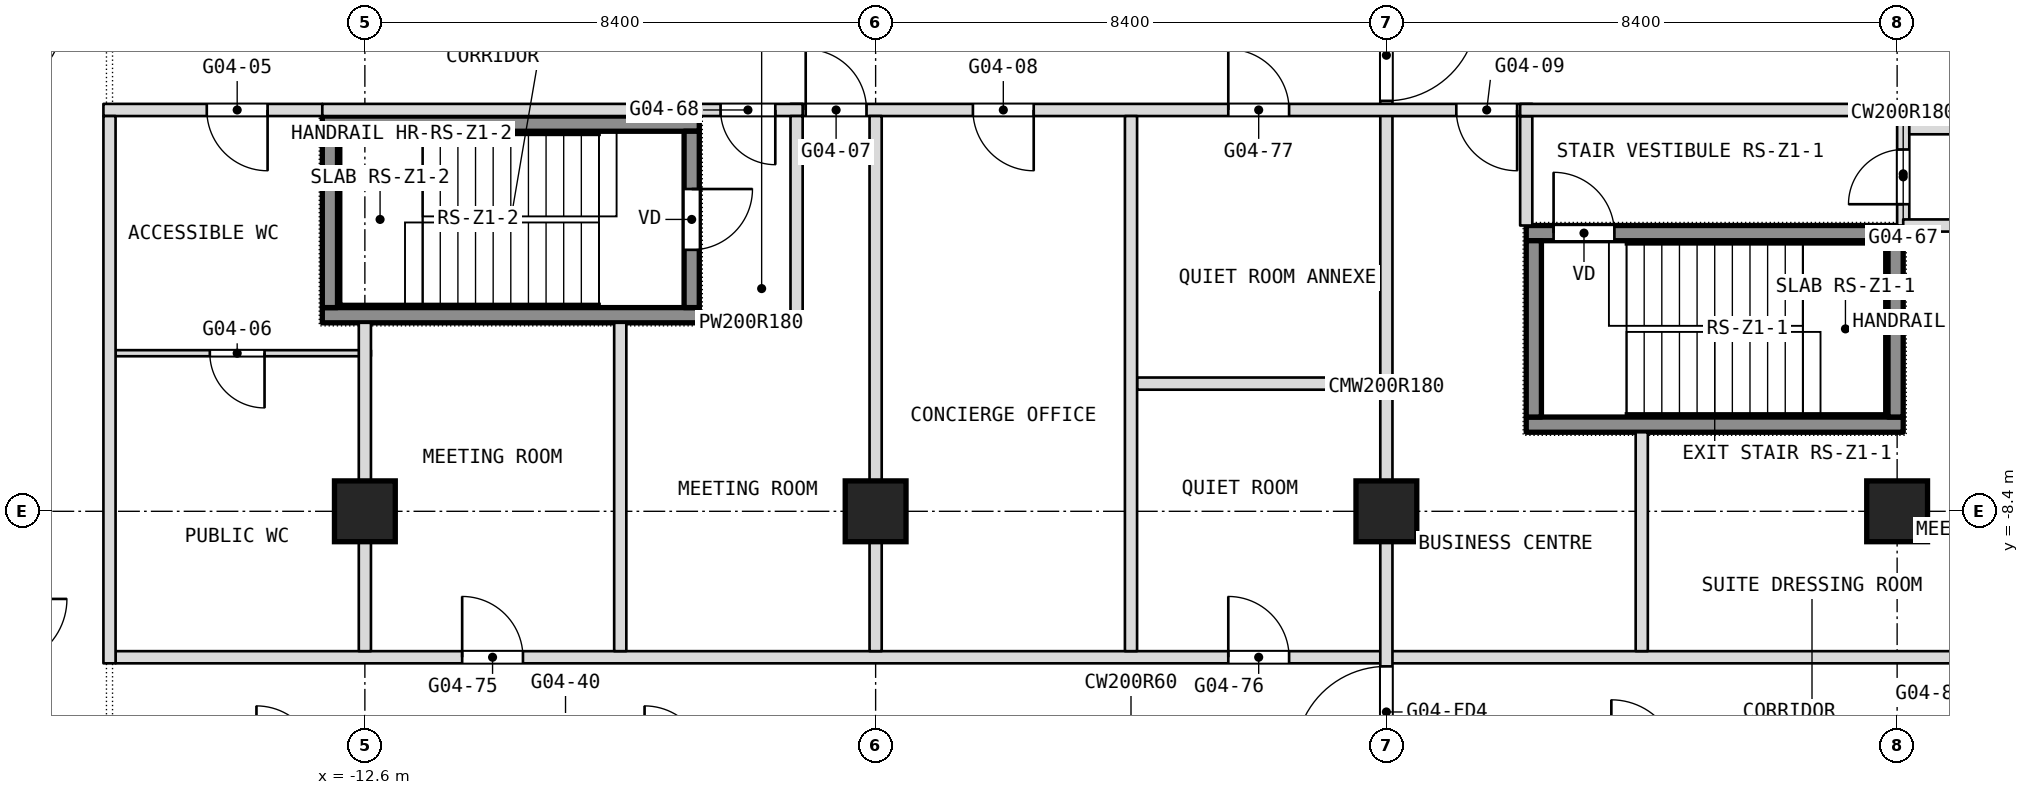
"""IFC4 building model, lengths in metres.
Left out: names, types, materials, properties, quantities, classifications, styles, units other than length and angle.
Written with IfcOpenShell. Run it as: python <this file> out.ifc"""

import sys

from ifc_helpers import new_model, si_unit, direction, frame, frame_2d, origin, origin_2d, place, context, subcontext, project, spatial, rectangle, extrude, element, fill, save


model = new_model("IFC4")
c1 = context("Model", 3, precision=1e-05, world=origin(), true_north=direction((0.0, 1.0)))
c2 = subcontext(c1, "Body", "Model", "MODEL_VIEW")
j1 = project(units=[si_unit("LENGTHUNIT", "METRE"), si_unit("PLANEANGLEUNIT", "RADIAN")], contexts=[c1])
p1 = place(None, origin())
s1 = spatial("IfcSite", under=j1, at=p1, CompositionType="ELEMENT")
p2 = place(p1, origin())
s2 = spatial("IfcBuilding", under=s1, at=p2, CompositionType="ELEMENT")
p3 = place(p2, frame((0.0, 0.0, 58.1)))
s3 = spatial("IfcBuildingStorey", under=s2, at=p3, CompositionType="ELEMENT", Elevation=58.1)
for number, where, z_axis, x_axis in (
    (1, (-12.6, -8.4, 0.0), (0.0, 0.0, 1.0), (1.0, 0.0, 0.0)),
    (2, (-4.2, -8.4, 0.0), (0.0, 0.0, 1.0), (1.0, 0.0, 0.0)),
    (3, (4.2, -8.4, 0.0), (0.0, 0.0, 1.0), (1.0, 0.0, 0.0)),
    (4, (12.6, -8.4, 0.0), (0.0, 0.0, 1.0), (1.0, 0.0, 0.0)),
):
    element("IfcColumn", number, at=place(p3, frame(where, z_axis=z_axis, x_axis=x_axis)), inside=s3, PredefinedType="COLUMN", context=c2, shape_type="SweptSolid", body=[
        extrude(rectangle(XDim=1.0, YDim=1.0, at=origin_2d()), origin(), (0.0, 0.0, 1.0), 3.6),
    ])
p4 = place(p3, frame((12.7, -3.7, 0.0), z_axis=(0.0, 0.0, 1.0), x_axis=(0.0, 1.0, 0.0)))
e5 = element("IfcWall", 5, at=p4, inside=s3, PredefinedType="PARTITIONING", context=c2, shape_type="SweptSolid", body=[
    extrude(rectangle(XDim=1.7, YDim=0.2, at=frame_2d((0.85, 0.0))), origin(), (0.0, 0.0, 1.0), 3.34),
])
p5 = place(p4, frame((0.35, 0.0, 0.0)))
e6 = element("IfcOpeningElement", 6, at=p5, cuts=e5, PredefinedType="OPENING", context=c2, shape_type="SweptSolid", body=[
    extrude(rectangle(XDim=0.9, YDim=2.1, at=frame_2d((0.45, 1.05))), frame((0.0, 0.1, 0.0), z_axis=(0.0, -1.0, 0.0), x_axis=(1.0, 0.0, 0.0)), (0.0, 0.0, 1.0), 0.2),
])
p6 = place(p3, frame((-16.7, -10.8, 0.0), z_axis=(0.0, 0.0, 1.0), x_axis=(1.0, 0.0, 0.0)))
e7 = element("IfcWall", 7, at=p6, inside=s3, PredefinedType="PARTITIONING", context=c2, shape_type="SweptSolid", body=[
    extrude(rectangle(XDim=33.4, YDim=0.2, at=frame_2d((16.7, 0.0))), origin(), (0.0, 0.0, 1.0), 3.34),
])
p7 = place(p6, frame((5.7, 0.0, 0.0)))
e8 = element("IfcOpeningElement", 8, at=p7, cuts=e7, PredefinedType="OPENING", context=c2, shape_type="SweptSolid", body=[
    extrude(rectangle(XDim=1.0, YDim=2.1, at=frame_2d((0.5, 1.05))), frame((0.0, 0.1, 0.0), z_axis=(0.0, -1.0, 0.0), x_axis=(1.0, 0.0, 0.0)), (0.0, 0.0, 1.0), 0.2),
])
p8 = place(p6, frame((18.3, 0.0, 0.0)))
e9 = element("IfcOpeningElement", 9, at=p8, cuts=e7, PredefinedType="OPENING", context=c2, shape_type="SweptSolid", body=[
    extrude(rectangle(XDim=1.0, YDim=2.1, at=frame_2d((0.5, 1.05))), frame((0.0, 0.1, 0.0), z_axis=(0.0, -1.0, 0.0), x_axis=(1.0, 0.0, 0.0)), (0.0, 0.0, 1.0), 0.2),
])
p9 = place(p3, frame((8.4, -10.7, 0.0), z_axis=(0.0, 0.0, 1.0), x_axis=(0.0, 1.0, 0.0)))
e10 = element("IfcWall", 10, at=p9, inside=s3, PredefinedType="PARTITIONING", context=c2, shape_type="SweptSolid", body=[
    extrude(rectangle(XDim=3.6, YDim=0.2, at=frame_2d((1.8, 0.0))), origin(), (0.0, 0.0, 1.0), 3.34),
])
p10 = place(p3, frame((6.5, -3.7, 0.0), z_axis=(0.0, 0.0, 1.0), x_axis=(0.0, 1.0, 0.0)))
e11 = element("IfcWall", 11, at=p10, inside=s3, PredefinedType="PARTITIONING", context=c2, shape_type="SweptSolid", body=[
    extrude(rectangle(XDim=1.8, YDim=0.2, at=frame_2d((0.9, 0.0))), origin(), (0.0, 0.0, 1.0), 3.34),
])
p11 = place(p3, frame((0.1, -6.3, 0.0), z_axis=(0.0, 0.0, 1.0), x_axis=(1.0, 0.0, 0.0)))
e12 = element("IfcWall", 12, at=p11, inside=s3, PredefinedType="PARTITIONING", context=c2, shape_type="SweptSolid", body=[
    extrude(rectangle(XDim=4.0, YDim=0.2, at=frame_2d((2.0, 0.0))), origin(), (0.0, 0.0, 1.0), 3.34),
])
p12 = place(p3, frame((-16.7, -5.8, 0.0), z_axis=(0.0, 0.0, 1.0), x_axis=(1.0, 0.0, 0.0)))
e13 = element("IfcWall", 13, at=p12, inside=s3, PredefinedType="PARTITIONING", context=c2, shape_type="SweptSolid", body=[
    extrude(rectangle(XDim=4.2, YDim=0.1, at=frame_2d((2.1, 0.0))), origin(), (0.0, 0.0, 1.0), 3.34),
])
p13 = place(p12, frame((1.55, 0.0, 0.0)))
e14 = element("IfcOpeningElement", 14, at=p13, cuts=e13, PredefinedType="OPENING", context=c2, shape_type="SweptSolid", body=[
    extrude(rectangle(XDim=0.9, YDim=2.1, at=frame_2d((0.45, 1.05))), frame((0.0, 0.05, 0.0), z_axis=(0.0, -1.0, 0.0), x_axis=(1.0, 0.0, 0.0)), (0.0, 0.0, 1.0), 0.1),
])
p14 = place(p3, frame((-7.1, -5.3, 0.0), z_axis=(0.0, 0.0, 1.0), x_axis=(1.0, 0.0, 0.0)))
e15 = element("IfcWall", 15, at=p14, inside=s3, PredefinedType="PARTITIONING", context=c2, shape_type="SweptSolid", body=[
    extrude(rectangle(XDim=1.7, YDim=0.2, at=frame_2d((0.85, 0.0))), origin(), (0.0, 0.0, 1.0), 3.34),
])
p15 = place(p3, frame((4.2, -12.7, 0.0), z_axis=(0.0, 0.0, 1.0), x_axis=(0.0, 1.0, 0.0)))
e16 = element("IfcWall", 16, at=p15, inside=s3, PredefinedType="PARTITIONING", context=c2, shape_type="SweptSolid", body=[
    extrude(rectangle(XDim=12.7, YDim=0.2, at=frame_2d((6.35, 0.0))), origin(), (0.0, 0.0, 1.0), 3.34),
])
p16 = place(p15, frame((11.05, 0.0, 0.0)))
e17 = element("IfcOpeningElement", 17, at=p16, cuts=e16, PredefinedType="OPENING", context=c2, shape_type="SweptSolid", body=[
    extrude(rectangle(XDim=1.5, YDim=2.1, at=frame_2d((0.75, 1.05))), frame((0.0, 0.1, 0.0), z_axis=(0.0, -1.0, 0.0), x_axis=(1.0, 0.0, 0.0)), (0.0, 0.0, 1.0), 0.2),
])
p17 = place(p15, frame((0.25, 0.0, 0.0)))
e18 = element("IfcOpeningElement", 18, at=p17, cuts=e16, PredefinedType="OPENING", context=c2, shape_type="SweptSolid", body=[
    extrude(rectangle(XDim=1.5, YDim=2.1, at=frame_2d((0.75, 1.05))), frame((0.0, 0.1, 0.0), z_axis=(0.0, -1.0, 0.0), x_axis=(1.0, 0.0, 0.0)), (0.0, 0.0, 1.0), 0.2),
])
p18 = place(p3, frame((12.7, -3.7, 0.0), z_axis=(0.0, 0.0, 1.0), x_axis=(1.0, 0.0, 0.0)))
e19 = element("IfcWall", 19, at=p18, inside=s3, PredefinedType="PARTITIONING", context=c2, shape_type="SweptSolid", body=[
    extrude(rectangle(XDim=4.0, YDim=0.2, at=frame_2d((2.0, 0.0))), origin(), (0.0, 0.0, 1.0), 3.34),
])
p19 = place(p3, frame((12.8, -2.1, 0.0), z_axis=(0.0, 0.0, 1.0), x_axis=(1.0, 0.0, 0.0)))
e20 = element("IfcWall", 20, at=p19, inside=s3, PredefinedType="PARTITIONING", context=c2, shape_type="SweptSolid", body=[
    extrude(rectangle(XDim=4.1, YDim=0.2, at=frame_2d((2.05, 0.0))), origin(), (0.0, 0.0, 1.0), 3.34),
])
p20 = place(p3, frame((-16.9, -1.8, 0.0), z_axis=(0.0, 0.0, 1.0), x_axis=(1.0, 0.0, 0.0)))
e21 = element("IfcWall", 21, at=p20, inside=s3, PredefinedType="PARTITIONING", context=c2, shape_type="SweptSolid", body=[
    extrude(rectangle(XDim=3.6, YDim=0.2, at=frame_2d((1.8, 0.0))), origin(), (0.0, 0.0, 1.0), 3.34),
])
p21 = place(p20, frame((1.7, 0.0, 0.0)))
e22 = element("IfcOpeningElement", 22, at=p21, cuts=e21, PredefinedType="OPENING", context=c2, shape_type="SweptSolid", body=[
    extrude(rectangle(XDim=1.0, YDim=2.1, at=frame_2d((0.5, 1.05))), frame((0.0, 0.1, 0.0), z_axis=(0.0, -1.0, 0.0), x_axis=(1.0, 0.0, 0.0)), (0.0, 0.0, 1.0), 0.2),
])
p22 = place(p3, frame((-5.6, -1.8, 0.0), z_axis=(0.0, 0.0, 1.0), x_axis=(1.0, 0.0, 0.0)))
e23 = element("IfcWall", 23, at=p22, inside=s3, PredefinedType="PARTITIONING", context=c2, shape_type="SweptSolid", body=[
    extrude(rectangle(XDim=12.2, YDim=0.2, at=frame_2d((6.1, 0.0))), origin(), (0.0, 0.0, 1.0), 3.34),
])
p23 = place(p22, frame((0.25, 0.0, 0.0)))
e24 = element("IfcOpeningElement", 24, at=p23, cuts=e23, PredefinedType="OPENING", context=c2, shape_type="SweptSolid", body=[
    extrude(rectangle(XDim=1.0, YDim=2.1, at=frame_2d((0.5, 1.05))), frame((0.0, 0.1, 0.0), z_axis=(0.0, -1.0, 0.0), x_axis=(1.0, 0.0, 0.0)), (0.0, 0.0, 1.0), 0.2),
])
p24 = place(p22, frame((3.0, 0.0, 0.0)))
e25 = element("IfcOpeningElement", 25, at=p24, cuts=e23, PredefinedType="OPENING", context=c2, shape_type="SweptSolid", body=[
    extrude(rectangle(XDim=1.0, YDim=2.1, at=frame_2d((0.5, 1.05))), frame((0.0, 0.1, 0.0), z_axis=(0.0, -1.0, 0.0), x_axis=(1.0, 0.0, 0.0)), (0.0, 0.0, 1.0), 0.2),
])
p25 = place(p22, frame((10.95, 0.0, 0.0)))
e26 = element("IfcOpeningElement", 26, at=p25, cuts=e23, PredefinedType="OPENING", context=c2, shape_type="SweptSolid", body=[
    extrude(rectangle(XDim=1.0, YDim=2.1, at=frame_2d((0.5, 1.05))), frame((0.0, 0.1, 0.0), z_axis=(0.0, -1.0, 0.0), x_axis=(1.0, 0.0, 0.0)), (0.0, 0.0, 1.0), 0.2),
])
p26 = place(p22, frame((7.2, 0.0, 0.0)))
e27 = element("IfcOpeningElement", 27, at=p26, cuts=e23, PredefinedType="OPENING", context=c2, shape_type="SweptSolid", body=[
    extrude(rectangle(XDim=1.0, YDim=2.1, at=frame_2d((0.5, 1.05))), frame((0.0, 0.1, 0.0), z_axis=(0.0, -1.0, 0.0), x_axis=(1.0, 0.0, 0.0)), (0.0, 0.0, 1.0), 0.2),
])
p27 = place(p3, frame((-13.3, -1.8, 0.0), z_axis=(0.0, 0.0, 1.0), x_axis=(1.0, 0.0, 0.0)))
e28 = element("IfcWall", 28, at=p27, inside=s3, PredefinedType="PARTITIONING", context=c2, shape_type="SweptSolid", body=[
    extrude(rectangle(XDim=7.9, YDim=0.2, at=frame_2d((3.95, 0.0))), origin(), (0.0, 0.0, 1.0), 3.34),
])
p28 = place(p27, frame((6.55, 0.0, 0.0)))
e29 = element("IfcOpeningElement", 29, at=p28, cuts=e28, PredefinedType="OPENING", context=c2, shape_type="SweptSolid", body=[
    extrude(rectangle(XDim=0.9, YDim=2.1, at=frame_2d((0.45, 1.05))), frame((0.0, 0.1, 0.0), z_axis=(0.0, -1.0, 0.0), x_axis=(1.0, 0.0, 0.0)), (0.0, 0.0, 1.0), 0.2),
])
p29 = place(p3, frame((6.4, -1.8, 0.0), z_axis=(0.0, 0.0, 1.0), x_axis=(1.0, 0.0, 0.0)))
e30 = element("IfcWall", 30, at=p29, inside=s3, PredefinedType="PARTITIONING", context=c2, shape_type="SweptSolid", body=[
    extrude(rectangle(XDim=10.5, YDim=0.2, at=frame_2d((5.25, 0.0))), origin(), (0.0, 0.0, 1.0), 3.34),
])
for number, where, z_axis, x_axis in (
    (31, (0.0, -10.7, 0.0), (0.0, 0.0, 1.0), (0.0, 1.0, 0.0)),
    (32, (-4.2, -10.7, 0.0), (0.0, 0.0, 1.0), (0.0, 1.0, 0.0)),
):
    element("IfcWall", number, at=place(p3, frame(where, z_axis=z_axis, x_axis=x_axis)), inside=s3, PredefinedType="PARTITIONING", context=c2, shape_type="SweptSolid", body=[
        extrude(rectangle(XDim=8.8, YDim=0.2, at=frame_2d((4.4, 0.0))), origin(), (0.0, 0.0, 1.0), 3.34),
    ])
p30 = place(p3, frame((-5.5, -5.2, 0.0), z_axis=(0.0, 0.0, 1.0), x_axis=(0.0, 1.0, 0.0)))
e33 = element("IfcWall", 33, at=p30, inside=s3, PredefinedType="PARTITIONING", context=c2, shape_type="SweptSolid", body=[
    extrude(rectangle(XDim=3.3, YDim=0.2, at=frame_2d((1.65, 0.0))), origin(), (0.0, 0.0, 1.0), 3.34),
])
for number, where, z_axis, x_axis in (
    (34, (-8.4, -10.7, 0.0), (0.0, 0.0, 1.0), (0.0, 1.0, 0.0)),
    (35, (-12.6, -10.7, 0.0), (0.0, 0.0, 1.0), (0.0, 1.0, 0.0)),
):
    element("IfcWall", number, at=place(p3, frame(where, z_axis=z_axis, x_axis=x_axis)), inside=s3, PredefinedType="PARTITIONING", context=c2, shape_type="SweptSolid", body=[
        extrude(rectangle(XDim=5.4, YDim=0.2, at=frame_2d((2.7, 0.0))), origin(), (0.0, 0.0, 1.0), 3.34),
    ])
p31 = place(p3, frame((-16.8, -10.9, 0.0), z_axis=(0.0, 0.0, 1.0), x_axis=(0.0, 1.0, 0.0)))
e36 = element("IfcWall", 36, at=p31, inside=s3, PredefinedType="PARTITIONING", context=c2, shape_type="SweptSolid", body=[
    extrude(rectangle(XDim=9.0, YDim=0.2, at=frame_2d((4.5, 0.0))), origin(), (0.0, 0.0, 1.0), 3.34),
])
p32 = place(p3, frame((6.5, -6.975, 0.1), z_axis=(0.0, 0.0, 1.0), x_axis=(1.0, 0.0, 0.0)))
e37 = element("IfcWall", 37, at=p32, inside=s3, PredefinedType="SHEAR", context=c2, shape_type="SweptSolid", body=[
    extrude(rectangle(XDim=6.2, YDim=0.25, at=frame_2d((3.1, 0.0))), origin(), (0.0, 0.0, 1.0), 3.6),
])
p33 = place(p3, frame((6.5, -3.825, 0.1), z_axis=(0.0, 0.0, 1.0), x_axis=(1.0, 0.0, 0.0)))
e38 = element("IfcWall", 38, at=p33, inside=s3, PredefinedType="SHEAR", context=c2, shape_type="SweptSolid", body=[
    extrude(rectangle(XDim=6.2, YDim=0.25, at=frame_2d((3.1, 0.0))), origin(), (0.0, 0.0, 1.0), 3.6),
])
p34 = place(p33, frame((0.45, 0.0, 0.0)))
e39 = element("IfcOpeningElement", 39, at=p34, cuts=e38, PredefinedType="OPENING", context=c2, shape_type="SweptSolid", body=[
    extrude(rectangle(XDim=1.0, YDim=2.1, at=frame_2d((0.5, 1.05))), frame((0.0, 0.125, 0.0), z_axis=(0.0, -1.0, 0.0), x_axis=(1.0, 0.0, 0.0)), (0.0, 0.0, 1.0), 0.25),
])
for number, where, z_axis, x_axis in (
    (40, (6.625, -6.85, 0.1), (0.0, 0.0, 1.0), (0.0, 1.0, 0.0)),
    (41, (12.575, -6.85, 0.1), (0.0, 0.0, 1.0), (0.0, 1.0, 0.0)),
):
    element("IfcWall", number, at=place(p3, frame(where, z_axis=z_axis, x_axis=x_axis)), inside=s3, PredefinedType="SHEAR", context=c2, shape_type="SweptSolid", body=[
        extrude(rectangle(XDim=2.9, YDim=0.25, at=frame_2d((1.45, 0.0))), origin(), (0.0, 0.0, 1.0), 3.6),
    ])
for number, where, z_axis, x_axis in (
    (42, (-13.3, -5.175, 0.1), (0.0, 0.0, 1.0), (1.0, 0.0, 0.0)),
    (43, (-13.3, -2.025, 0.1), (0.0, 0.0, 1.0), (1.0, 0.0, 0.0)),
):
    element("IfcWall", number, at=place(p3, frame(where, z_axis=z_axis, x_axis=x_axis)), inside=s3, PredefinedType="SHEAR", context=c2, shape_type="SweptSolid", body=[
        extrude(rectangle(XDim=6.2, YDim=0.25, at=frame_2d((3.1, 0.0))), origin(), (0.0, 0.0, 1.0), 3.6),
    ])
p35 = place(p3, frame((-13.175, -5.05, 0.1), z_axis=(0.0, 0.0, 1.0), x_axis=(0.0, 1.0, 0.0)))
e44 = element("IfcWall", 44, at=p35, inside=s3, PredefinedType="SHEAR", context=c2, shape_type="SweptSolid", body=[
    extrude(rectangle(XDim=2.9, YDim=0.25, at=frame_2d((1.45, 0.0))), origin(), (0.0, 0.0, 1.0), 3.6),
])
p36 = place(p3, frame((-7.225, -5.05, 0.1), z_axis=(0.0, 0.0, 1.0), x_axis=(0.0, 1.0, 0.0)))
e45 = element("IfcWall", 45, at=p36, inside=s3, PredefinedType="SHEAR", context=c2, shape_type="SweptSolid", body=[
    extrude(rectangle(XDim=2.9, YDim=0.25, at=frame_2d((1.45, 0.0))), origin(), (0.0, 0.0, 1.0), 3.6),
])
p37 = place(p36, frame((0.95, 0.0, 0.0)))
e46 = element("IfcOpeningElement", 46, at=p37, cuts=e45, PredefinedType="OPENING", context=c2, shape_type="SweptSolid", body=[
    extrude(rectangle(XDim=1.0, YDim=2.1, at=frame_2d((0.5, 1.05))), frame((0.0, 0.125, 0.0), z_axis=(0.0, -1.0, 0.0), x_axis=(1.0, 0.0, 0.0)), (0.0, 0.0, 1.0), 0.25),
])
p38 = place(p5, origin())
e47 = element("IfcDoor", 47, at=p38, inside=s3, OperationType="SINGLE_SWING_RIGHT", PredefinedType="DOOR", context=c2, shape_type="SweptSolid", body=[
    extrude(rectangle(XDim=0.9, YDim=2.1, at=frame_2d((0.45, 1.05))), frame((0.0, 0.025, 0.0), z_axis=(0.0, -1.0, 0.0), x_axis=(1.0, 0.0, 0.0)), (0.0, 0.0, 1.0), 0.05),
])
fill(e6, e47)
p39 = place(p7, origin())
e48 = element("IfcDoor", 48, at=p39, inside=s3, OperationType="SINGLE_SWING_LEFT", PredefinedType="DOOR", context=c2, shape_type="SweptSolid", body=[
    extrude(rectangle(XDim=1.0, YDim=2.1, at=frame_2d((0.5, 1.05))), frame((0.0, 0.025, 0.0), z_axis=(0.0, -1.0, 0.0), x_axis=(1.0, 0.0, 0.0)), (0.0, 0.0, 1.0), 0.05),
])
fill(e8, e48)
p40 = place(p8, origin())
e49 = element("IfcDoor", 49, at=p40, inside=s3, OperationType="SINGLE_SWING_RIGHT", PredefinedType="DOOR", context=c2, shape_type="SweptSolid", body=[
    extrude(rectangle(XDim=1.0, YDim=2.1, at=frame_2d((0.5, 1.05))), frame((0.0, 0.025, 0.0), z_axis=(0.0, -1.0, 0.0), x_axis=(1.0, 0.0, 0.0)), (0.0, 0.0, 1.0), 0.05),
])
fill(e9, e49)
p41 = place(p13, origin())
e50 = element("IfcDoor", 50, at=p41, inside=s3, OperationType="SINGLE_SWING_RIGHT", PredefinedType="DOOR", context=c2, shape_type="SweptSolid", body=[
    extrude(rectangle(XDim=0.9, YDim=2.1, at=frame_2d((0.45, 1.05))), frame((0.0, 0.025, 0.0), z_axis=(0.0, -1.0, 0.0), x_axis=(1.0, 0.0, 0.0)), (0.0, 0.0, 1.0), 0.05),
])
fill(e14, e50)
p42 = place(p21, origin())
e51 = element("IfcDoor", 51, at=p42, inside=s3, OperationType="SINGLE_SWING_RIGHT", PredefinedType="DOOR", context=c2, shape_type="SweptSolid", body=[
    extrude(rectangle(XDim=1.0, YDim=2.1, at=frame_2d((0.5, 1.05))), frame((0.0, 0.025, 0.0), z_axis=(0.0, -1.0, 0.0), x_axis=(1.0, 0.0, 0.0)), (0.0, 0.0, 1.0), 0.05),
])
fill(e22, e51)
p43 = place(p23, origin())
e52 = element("IfcDoor", 52, at=p43, inside=s3, OperationType="SINGLE_SWING_RIGHT", PredefinedType="DOOR", context=c2, shape_type="SweptSolid", body=[
    extrude(rectangle(XDim=1.0, YDim=2.1, at=frame_2d((0.5, 1.05))), frame((0.0, 0.025, 0.0), z_axis=(0.0, -1.0, 0.0), x_axis=(1.0, 0.0, 0.0)), (0.0, 0.0, 1.0), 0.05),
])
fill(e24, e52)
p44 = place(p24, origin())
e53 = element("IfcDoor", 53, at=p44, inside=s3, OperationType="SINGLE_SWING_LEFT", PredefinedType="DOOR", context=c2, shape_type="SweptSolid", body=[
    extrude(rectangle(XDim=1.0, YDim=2.1, at=frame_2d((0.5, 1.05))), frame((0.0, 0.025, 0.0), z_axis=(0.0, -1.0, 0.0), x_axis=(1.0, 0.0, 0.0)), (0.0, 0.0, 1.0), 0.05),
])
fill(e25, e53)
p45 = place(p25, origin())
e54 = element("IfcDoor", 54, at=p45, inside=s3, OperationType="SINGLE_SWING_RIGHT", PredefinedType="DOOR", context=c2, shape_type="SweptSolid", body=[
    extrude(rectangle(XDim=1.0, YDim=2.1, at=frame_2d((0.5, 1.05))), frame((0.0, 0.025, 0.0), z_axis=(0.0, -1.0, 0.0), x_axis=(1.0, 0.0, 0.0)), (0.0, 0.0, 1.0), 0.05),
])
fill(e26, e54)
p46 = place(p26, origin())
e55 = element("IfcDoor", 55, at=p46, inside=s3, OperationType="SINGLE_SWING_RIGHT", PredefinedType="DOOR", context=c2, shape_type="SweptSolid", body=[
    extrude(rectangle(XDim=1.0, YDim=2.1, at=frame_2d((0.5, 1.05))), frame((0.0, 0.025, 0.0), z_axis=(0.0, -1.0, 0.0), x_axis=(1.0, 0.0, 0.0)), (0.0, 0.0, 1.0), 0.05),
])
fill(e27, e55)
p47 = place(p28, origin())
e56 = element("IfcDoor", 56, at=p47, inside=s3, OperationType="SINGLE_SWING_LEFT", PredefinedType="DOOR", context=c2, shape_type="SweptSolid", body=[
    extrude(rectangle(XDim=0.9, YDim=2.1, at=frame_2d((0.45, 1.05))), frame((0.0, 0.025, 0.0), z_axis=(0.0, -1.0, 0.0), x_axis=(1.0, 0.0, 0.0)), (0.0, 0.0, 1.0), 0.05),
])
fill(e29, e56)
p48 = place(p34, origin())
e57 = element("IfcDoor", 57, at=p48, inside=s3, OperationType="SINGLE_SWING_LEFT", PredefinedType="DOOR", context=c2, shape_type="SweptSolid", body=[
    extrude(rectangle(XDim=1.0, YDim=2.1, at=frame_2d((0.5, 1.05))), frame((0.0, 0.025, 0.0), z_axis=(0.0, -1.0, 0.0), x_axis=(1.0, 0.0, 0.0)), (0.0, 0.0, 1.0), 0.05),
])
fill(e39, e57)
p49 = place(p37, origin())
e58 = element("IfcDoor", 58, at=p49, inside=s3, OperationType="SINGLE_SWING_LEFT", PredefinedType="DOOR", context=c2, shape_type="SweptSolid", body=[
    extrude(rectangle(XDim=1.0, YDim=2.1, at=frame_2d((0.5, 1.05))), frame((0.0, 0.025, 0.0), z_axis=(0.0, -1.0, 0.0), x_axis=(1.0, 0.0, 0.0)), (0.0, 0.0, 1.0), 0.05),
])
fill(e46, e58)
p50 = place(p16, origin())
e59 = element("IfcDoor", 59, at=p50, inside=s3, OperationType="DOUBLE_DOOR_DOUBLE_SWING", PredefinedType="DOOR", context=c2, shape_type="SweptSolid", body=[
    extrude(rectangle(XDim=1.5, YDim=2.1, at=frame_2d((0.75, 1.05))), frame((0.0, 0.025, 0.0), z_axis=(0.0, -1.0, 0.0), x_axis=(1.0, 0.0, 0.0)), (0.0, 0.0, 1.0), 0.05),
])
fill(e17, e59)
p51 = place(p17, origin())
e60 = element("IfcDoor", 60, at=p51, inside=s3, OperationType="DOUBLE_DOOR_DOUBLE_SWING", PredefinedType="DOOR", context=c2, shape_type="SweptSolid", body=[
    extrude(rectangle(XDim=1.5, YDim=2.1, at=frame_2d((0.75, 1.05))), frame((0.0, 0.025, 0.0), z_axis=(0.0, -1.0, 0.0), x_axis=(1.0, 0.0, 0.0)), (0.0, 0.0, 1.0), 0.05),
])
fill(e18, e60)
save(model, sys.argv[1])
